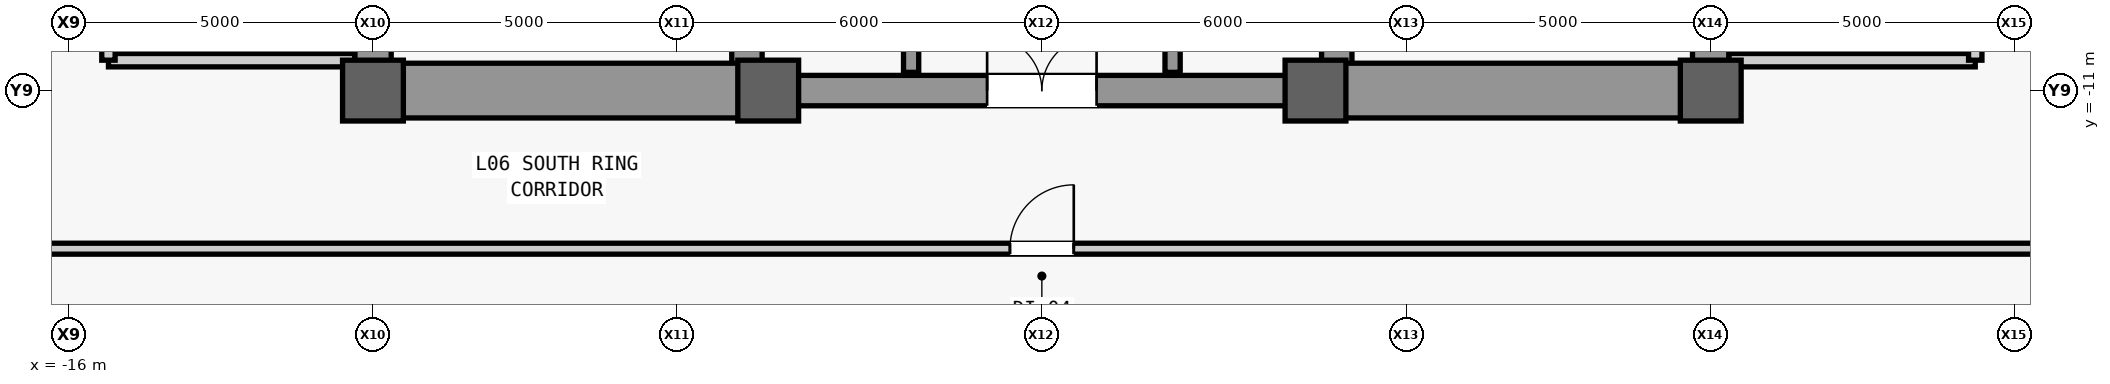
"""IFC4 building model, lengths in metres.
Left out: names, types, materials, properties, quantities, classifications, styles, units other than length and angle.
Written with IfcOpenShell. Run it as: python <this file> out.ifc"""

import sys

from ifc_helpers import new_model, si_unit, direction, frame, frame_2d, origin, origin_2d, place, context, subcontext, project, spatial, rectangle, extrude, source, transform, mapped, element, fill, save


model = new_model("IFC4")
c1 = context("Model", 3, precision=1e-05, world=origin(), true_north=direction((0.0, 1.0)))
c2 = subcontext(c1, "Body", "Model", "MODEL_VIEW")
j1 = project(units=[si_unit("LENGTHUNIT", "METRE"), si_unit("PLANEANGLEUNIT", "RADIAN")], contexts=[c1])
p1 = place(None, origin())
s1 = spatial("IfcSite", under=j1, at=p1, CompositionType="ELEMENT")
p2 = place(p1, origin())
s2 = spatial("IfcBuilding", under=s1, at=p2, CompositionType="ELEMENT")
p3 = place(p2, frame((0.0, 0.0, 32.6)))
s3 = spatial("IfcBuildingStorey", under=s2, at=p3, CompositionType="ELEMENT", Elevation=32.6)
m1 = source(origin(), c2, "Body", "SweptSolid", [
    extrude(rectangle(XDim=22.0, YDim=0.6, at=frame_2d((11.0, 0.0))), origin(), (0.0, 0.0, 1.0), 3.94),
])
p4 = place(p3, frame((-11.0, -11.0, 0.0), z_axis=(0.0, 0.0, 1.0), x_axis=(0.0, 1.0, 0.0)))
e1 = element("IfcWall", 1, at=p4, inside=s3, PredefinedType="SHEAR", context=c2, shape_type="MappedRepresentation", body=[
    mapped(m1, transform((0.0, 0.0, 0.0), scale=1.0)),
])
m2 = source(origin(), c2, "Body", "SweptSolid", [
    extrude(rectangle(XDim=1.1, YDim=2.2, at=frame_2d((0.55, 1.1))), frame((0.0, 0.31, 0.0), z_axis=(0.0, -1.0, 0.0), x_axis=(1.0, 0.0, 0.0)), (0.0, 0.0, 1.0), 0.62),
])
p5 = place(p4, frame((0.8, 0.0, 0.0)))
e2 = element("IfcOpeningElement", 2, at=p5, cuts=e1, PredefinedType="OPENING", context=c2, shape_type="MappedRepresentation", body=[
    mapped(m2, transform((0.0, 0.0, 0.0), scale=1.0)),
])
p6 = place(p4, frame((12.5, 0.0, 0.0)))
e3 = element("IfcOpeningElement", 3, at=p6, cuts=e1, PredefinedType="OPENING", context=c2, shape_type="MappedRepresentation", body=[
    mapped(m2, transform((0.0, 0.0, 0.0), scale=1.0)),
])
m3 = source(origin(), c2, "Body", "SweptSolid", [
    extrude(rectangle(XDim=0.9, YDim=2.15, at=frame_2d((0.45, 1.075))), frame((0.0, 0.31, 0.0), z_axis=(0.0, -1.0, 0.0), x_axis=(1.0, 0.0, 0.0)), (0.0, 0.0, 1.0), 0.62),
])
p7 = place(p4, frame((6.85, 0.0, 0.0)))
e4 = element("IfcOpeningElement", 4, at=p7, cuts=e1, PredefinedType="OPENING", context=c2, shape_type="MappedRepresentation", body=[
    mapped(m3, transform((0.0, 0.0, 0.0), scale=1.0)),
])
m4 = source(origin(), c2, "Body", "SweptSolid", [
    extrude(rectangle(XDim=1.3, YDim=2.3, at=frame_2d((0.65, 1.15))), frame((0.0, 0.31, 0.0), z_axis=(0.0, -1.0, 0.0), x_axis=(1.0, 0.0, 0.0)), (0.0, 0.0, 1.0), 0.62),
])
p8 = place(p4, frame((2.7, 0.0, 0.0)))
e5 = element("IfcOpeningElement", 5, at=p8, cuts=e1, PredefinedType="OPENING", context=c2, shape_type="MappedRepresentation", body=[
    mapped(m4, transform((0.0, 0.0, 0.0), scale=1.0)),
])
p9 = place(p3, frame((11.0, -11.0, 0.0), z_axis=(0.0, 0.0, 1.0), x_axis=(0.0, 1.0, 0.0)))
e6 = element("IfcWall", 6, at=p9, inside=s3, PredefinedType="SHEAR", context=c2, shape_type="MappedRepresentation", body=[
    mapped(m1, transform((0.0, 0.0, 0.0), scale=1.0)),
])
p10 = place(p9, frame((0.8, 0.0, 0.0)))
e7 = element("IfcOpeningElement", 7, at=p10, cuts=e6, PredefinedType="OPENING", context=c2, shape_type="MappedRepresentation", body=[
    mapped(m2, transform((0.0, 0.0, 0.0), scale=1.0)),
])
p11 = place(p9, frame((6.2, 0.0, 0.0)))
e8 = element("IfcOpeningElement", 8, at=p11, cuts=e6, PredefinedType="OPENING", context=c2, shape_type="MappedRepresentation", body=[
    mapped(m3, transform((0.0, 0.0, 0.0), scale=1.0)),
])
p12 = place(p9, frame((8.05, 0.0, 0.0)))
e9 = element("IfcOpeningElement", 9, at=p12, cuts=e6, PredefinedType="OPENING", context=c2, shape_type="MappedRepresentation", body=[
    mapped(m3, transform((0.0, 0.0, 0.0), scale=1.0)),
])
p13 = place(p9, frame((2.7, 0.0, 0.0)))
e10 = element("IfcOpeningElement", 10, at=p13, cuts=e6, PredefinedType="OPENING", context=c2, shape_type="MappedRepresentation", body=[
    mapped(m4, transform((0.0, 0.0, 0.0), scale=1.0)),
])
p14 = place(p9, frame((13.35, 0.0, 0.0)))
e11 = element("IfcOpeningElement", 11, at=p14, cuts=e6, PredefinedType="OPENING", context=c2, shape_type="MappedRepresentation", body=[
    mapped(m4, transform((0.0, 0.0, 0.0), scale=1.0)),
])
m5 = source(origin(), c2, "Body", "SweptSolid", [
    extrude(rectangle(XDim=21.4, YDim=0.5, at=frame_2d((10.7, 0.0))), origin(), (0.0, 0.0, 1.0), 3.94),
])
for number, where, z_axis, x_axis in (
    (12, (-4.85, -10.7, 0.0), (0.0, 0.0, 1.0), (0.0, 1.0, 0.0)),
    (13, (4.85, -10.7, 0.0), (0.0, 0.0, 1.0), (0.0, 1.0, 0.0)),
):
    element("IfcWall", number, at=place(p3, frame(where, z_axis=z_axis, x_axis=x_axis)), inside=s3, PredefinedType="SHEAR", context=c2, shape_type="MappedRepresentation", body=[
        mapped(m5, transform((0.0, 0.0, 0.0), scale=1.0)),
    ])
m6 = source(origin(), c2, "Body", "SweptSolid", [
    extrude(rectangle(XDim=5.85, YDim=0.9, at=frame_2d((2.925, 0.0))), origin(), (0.0, 0.0, 1.0), 3.94),
])
for number, where, z_axis, x_axis in (
    (14, (-10.7, -11.0, 0.0), (0.0, 0.0, 1.0), (1.0, 0.0, 0.0)),
    (15, (4.85, -11.0, 0.0), (0.0, 0.0, 1.0), (1.0, 0.0, 0.0)),
):
    element("IfcWall", number, at=place(p3, frame(where, z_axis=z_axis, x_axis=x_axis)), inside=s3, PredefinedType="SHEAR", context=c2, shape_type="MappedRepresentation", body=[
        mapped(m6, transform((0.0, 0.0, 0.0), scale=1.0)),
    ])
m7 = source(origin(), c2, "Body", "SweptSolid", [
    extrude(rectangle(XDim=9.2, YDim=0.5, at=frame_2d((4.6, 0.0))), origin(), (0.0, 0.0, 1.0), 3.94),
])
p15 = place(p3, frame((-4.6, -11.0, 0.0), z_axis=(0.0, 0.0, 1.0), x_axis=(1.0, 0.0, 0.0)))
e16 = element("IfcWall", 16, at=p15, inside=s3, PredefinedType="SHEAR", context=c2, shape_type="MappedRepresentation", body=[
    mapped(m7, transform((0.0, 0.0, 0.0), scale=1.0)),
])
m8 = source(origin(), c2, "Body", "SweptSolid", [
    extrude(rectangle(XDim=1.8, YDim=2.25, at=frame_2d((0.9, 1.125))), frame((0.0, 0.26, 0.0), z_axis=(0.0, -1.0, 0.0), x_axis=(1.0, 0.0, 0.0)), (0.0, 0.0, 1.0), 0.52),
])
p16 = place(p15, frame((3.7, 0.0, 0.0)))
e17 = element("IfcOpeningElement", 17, at=p16, cuts=e16, PredefinedType="OPENING", context=c2, shape_type="MappedRepresentation", body=[
    mapped(m8, transform((0.0, 0.0, 0.0), scale=1.0)),
])
m9 = source(origin(), c2, "Body", "SweptSolid", [
    extrude(rectangle(XDim=1.0, YDim=1.0, at=origin_2d()), origin(), (0.0, 0.0, 1.0), 4.2),
])
for number, where, z_axis, x_axis in (
    (18, (-11.0, -11.0, 0.0), (0.0, 0.0, 1.0), (1.0, 0.0, 0.0)),
    (19, (-4.5, -11.0, 0.0), (0.0, 0.0, 1.0), (1.0, 0.0, 0.0)),
    (20, (4.5, -11.0, 0.0), (0.0, 0.0, 1.0), (1.0, 0.0, 0.0)),
    (21, (11.0, -11.0, 0.0), (0.0, 0.0, 1.0), (1.0, 0.0, 0.0)),
):
    element("IfcColumn", number, at=place(p3, frame(where, z_axis=z_axis, x_axis=x_axis)), inside=s3, PredefinedType="COLUMN", context=c2, shape_type="MappedRepresentation", body=[
        mapped(m9, transform((0.0, 0.0, 0.0), scale=1.0)),
    ])
m10 = source(origin(), c2, "Body", "SweptSolid", [
    extrude(rectangle(XDim=4.05, YDim=0.22, at=frame_2d((2.025, 0.0))), origin(), (0.0, 0.0, 1.0), 3.94),
])
p17 = place(p3, frame((-15.35, -10.5, 0.0), z_axis=(0.0, 0.0, 1.0), x_axis=(1.0, 0.0, 0.0)))
e22 = element("IfcWall", 22, at=p17, inside=s3, PredefinedType="PARTITIONING", context=c2, shape_type="MappedRepresentation", body=[
    mapped(m10, transform((0.0, 0.0, 0.0), scale=1.0)),
])
m11 = source(origin(), c2, "Body", "SweptSolid", [
    extrude(rectangle(XDim=4.4, YDim=0.22, at=frame_2d((2.2, 0.0))), origin(), (0.0, 0.0, 1.0), 3.94),
])
p18 = place(p3, frame((-15.35, -10.5, 0.0), z_axis=(0.0, 0.0, 1.0), x_axis=(0.0, 1.0, 0.0)))
e23 = element("IfcWall", 23, at=p18, inside=s3, PredefinedType="PARTITIONING", context=c2, shape_type="MappedRepresentation", body=[
    mapped(m11, transform((0.0, 0.0, 0.0), scale=1.0)),
])
m12 = source(origin(), c2, "Body", "SweptSolid", [
    extrude(rectangle(XDim=1.2, YDim=2.2, at=frame_2d((0.6, 1.1))), frame((0.0, 0.12, 0.0), z_axis=(0.0, -1.0, 0.0), x_axis=(1.0, 0.0, 0.0)), (0.0, 0.0, 1.0), 0.24),
])
p19 = place(p18, frame((1.6, 0.0, 0.0)))
e24 = element("IfcOpeningElement", 24, at=p19, cuts=e23, PredefinedType="OPENING", context=c2, shape_type="MappedRepresentation", body=[
    mapped(m12, transform((0.0, 0.0, 0.0), scale=1.0)),
])
p20 = place(p3, frame((11.3, -10.5, 0.0), z_axis=(0.0, 0.0, 1.0), x_axis=(1.0, 0.0, 0.0)))
e25 = element("IfcWall", 25, at=p20, inside=s3, PredefinedType="PARTITIONING", context=c2, shape_type="MappedRepresentation", body=[
    mapped(m10, transform((0.0, 0.0, 0.0), scale=1.0)),
])
p21 = place(p3, frame((15.35, -10.5, 0.0), z_axis=(0.0, 0.0, 1.0), x_axis=(0.0, 1.0, 0.0)))
e26 = element("IfcWall", 26, at=p21, inside=s3, PredefinedType="PARTITIONING", context=c2, shape_type="MappedRepresentation", body=[
    mapped(m11, transform((0.0, 0.0, 0.0), scale=1.0)),
])
p22 = place(p21, frame((1.6, 0.0, 0.0)))
e27 = element("IfcOpeningElement", 27, at=p22, cuts=e26, PredefinedType="OPENING", context=c2, shape_type="MappedRepresentation", body=[
    mapped(m12, transform((0.0, 0.0, 0.0), scale=1.0)),
])
m13 = source(origin(), c2, "Body", "SweptSolid", [
    extrude(rectangle(XDim=5.4, YDim=0.25, at=frame_2d((2.7, 0.0))), origin(), (0.0, 0.0, 1.0), 3.94),
])
p23 = place(p3, frame((-2.15, -10.7, 0.0), z_axis=(0.0, 0.0, 1.0), x_axis=(0.0, 1.0, 0.0)))
e28 = element("IfcWall", 28, at=p23, inside=s3, PredefinedType="SHEAR", context=c2, shape_type="MappedRepresentation", body=[
    mapped(m13, transform((0.0, 0.0, 0.0), scale=1.0)),
])
m14 = source(origin(), c2, "Body", "SweptSolid", [
    extrude(rectangle(XDim=1.2, YDim=2.3, at=frame_2d((0.6, 1.15))), frame((0.0, 0.135, 0.0), z_axis=(0.0, -1.0, 0.0), x_axis=(1.0, 0.0, 0.0)), (0.0, 0.0, 1.0), 0.27),
])
p24 = place(p23, frame((0.9, 0.0, 0.0)))
e29 = element("IfcOpeningElement", 29, at=p24, cuts=e28, PredefinedType="OPENING", context=c2, shape_type="MappedRepresentation", body=[
    mapped(m14, transform((0.0, 0.0, 0.0), scale=1.0)),
])
p25 = place(p23, frame((3.2, 0.0, 0.0)))
e30 = element("IfcOpeningElement", 30, at=p25, cuts=e28, PredefinedType="OPENING", context=c2, shape_type="MappedRepresentation", body=[
    mapped(m14, transform((0.0, 0.0, 0.0), scale=1.0)),
])
p26 = place(p3, frame((2.15, -10.7, 0.0), z_axis=(0.0, 0.0, 1.0), x_axis=(0.0, 1.0, 0.0)))
e31 = element("IfcWall", 31, at=p26, inside=s3, PredefinedType="SHEAR", context=c2, shape_type="MappedRepresentation", body=[
    mapped(m13, transform((0.0, 0.0, 0.0), scale=1.0)),
])
p27 = place(p26, frame((0.9, 0.0, 0.0)))
e32 = element("IfcOpeningElement", 32, at=p27, cuts=e31, PredefinedType="OPENING", context=c2, shape_type="MappedRepresentation", body=[
    mapped(m14, transform((0.0, 0.0, 0.0), scale=1.0)),
])
p28 = place(p26, frame((3.2, 0.0, 0.0)))
e33 = element("IfcOpeningElement", 33, at=p28, cuts=e31, PredefinedType="OPENING", context=c2, shape_type="MappedRepresentation", body=[
    mapped(m14, transform((0.0, 0.0, 0.0), scale=1.0)),
])
m15 = source(origin(), c2, "Body", "SweptSolid", [
    extrude(rectangle(XDim=36.25, YDim=0.18, at=frame_2d((18.125, 0.0))), origin(), (0.0, 0.0, 1.0), 3.94),
])
p29 = place(p3, frame((-17.7, -13.6, 0.0), z_axis=(0.0, 0.0, 1.0), x_axis=(1.0, 0.0, 0.0)))
e34 = element("IfcWall", 34, at=p29, inside=s3, PredefinedType="PARTITIONING", context=c2, shape_type="MappedRepresentation", body=[
    mapped(m15, transform((0.0, 0.0, 0.0), scale=1.0)),
])
m16 = source(origin(), c2, "Body", "SweptSolid", [
    extrude(rectangle(XDim=1.05, YDim=2.2, at=frame_2d((0.525, 1.1))), frame((0.0, 0.1, 0.0), z_axis=(0.0, -1.0, 0.0), x_axis=(1.0, 0.0, 0.0)), (0.0, 0.0, 1.0), 0.2),
])
p30 = place(p29, frame((17.175, 0.0, 0.0)))
e35 = element("IfcOpeningElement", 35, at=p30, cuts=e34, PredefinedType="OPENING", context=c2, shape_type="MappedRepresentation", body=[
    mapped(m16, transform((0.0, 0.0, 0.0), scale=1.0)),
])
m17 = source(origin(), c2, "Body", "SweptSolid", [
    extrude(rectangle(XDim=1.8, YDim=2.25, at=frame_2d((0.9, 1.125))), frame((0.0, 0.025, 0.0), z_axis=(0.0, -1.0, 0.0), x_axis=(1.0, 0.0, 0.0)), (0.0, 0.0, 1.0), 0.05),
])
p31 = place(p16, origin())
e36 = element("IfcDoor", 36, at=p31, inside=s3, OperationType="SINGLE_SWING_LEFT", PredefinedType="DOOR", context=c2, shape_type="MappedRepresentation", body=[
    mapped(m17, transform((0.0, 0.0, 0.0), scale=1.0)),
])
fill(e17, e36)
m18 = source(origin(), c2, "Body", "SweptSolid", [
    extrude(rectangle(XDim=1.05, YDim=2.2, at=frame_2d((0.525, 1.1))), frame((0.0, 0.025, 0.0), z_axis=(0.0, -1.0, 0.0), x_axis=(1.0, 0.0, 0.0)), (0.0, 0.0, 1.0), 0.05),
])
p32 = place(p30, origin())
e37 = element("IfcDoor", 37, at=p32, inside=s3, OperationType="SINGLE_SWING_RIGHT", PredefinedType="DOOR", context=c2, shape_type="MappedRepresentation", body=[
    mapped(m18, transform((0.0, 0.0, 0.0), scale=1.0)),
])
fill(e35, e37)
save(model, sys.argv[1])
